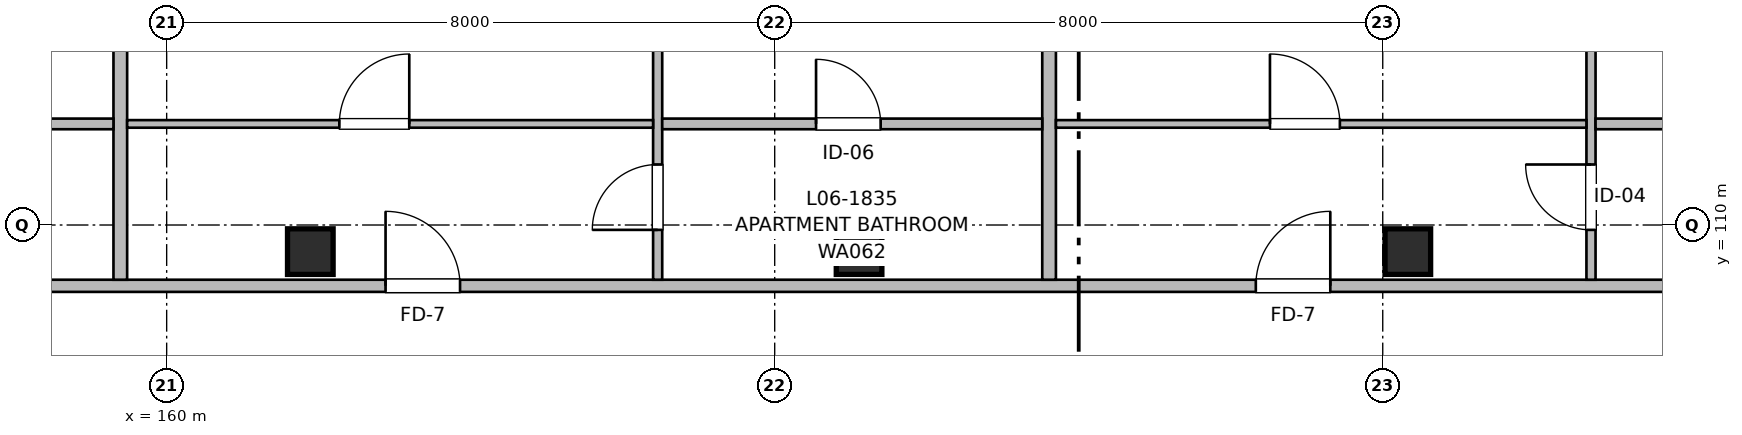
"""IFC4 building model, lengths in metres.
Left out: names, types, materials, properties, quantities, classifications, styles, units other than length and angle.
Written with IfcOpenShell. Run it as: python <this file> out.ifc"""

import sys

from ifc_helpers import new_model, si_unit, direction, frame, frame_2d, origin, origin_2d, place, context, subcontext, project, spatial, rectangle, extrude, element, fill, save


model = new_model("IFC4")
c1 = context("Model", 3, precision=1e-05, world=origin(), true_north=direction((0.0, 1.0)))
c2 = subcontext(c1, "Body", "Model", "MODEL_VIEW")
j1 = project(units=[si_unit("LENGTHUNIT", "METRE"), si_unit("PLANEANGLEUNIT", "RADIAN")], contexts=[c1])
p1 = place(None, origin())
s1 = spatial("IfcSite", under=j1, at=p1, CompositionType="ELEMENT")
p2 = place(p1, origin())
s2 = spatial("IfcBuilding", under=s1, at=p2, CompositionType="ELEMENT")
p3 = place(p2, frame((0.0, 0.0, 20.16)))
s3 = spatial("IfcBuildingStorey", under=s2, at=p3, CompositionType="ELEMENT", Elevation=20.16)
for number, where, z_axis, x_axis in (
    (1, (161.89, 109.65, 0.0), (0.0, 0.0, 1.0), (1.0, 0.0, 0.0)),
    (2, (169.11, 109.65, 0.0), (0.0, 0.0, 1.0), (1.0, 0.0, 0.0)),
    (3, (176.33, 109.65, 0.0), (0.0, 0.0, 1.0), (1.0, 0.0, 0.0)),
):
    element("IfcColumn", number, at=place(p3, frame(where, z_axis=z_axis, x_axis=x_axis)), inside=s3, PredefinedType="COLUMN", context=c2, shape_type="SweptSolid", body=[
        extrude(rectangle(XDim=0.6, YDim=0.6, at=origin_2d()), origin(), (0.0, 0.0, 1.0), 3.2),
    ])
p4 = place(p3, frame((147.16, 109.2, 0.0), z_axis=(0.0, 0.0, 1.0), x_axis=(1.0, 0.0, 0.0)))
e4 = element("IfcWall", 4, at=p4, inside=s3, PredefinedType="PARTITIONING", context=c2, shape_type="SweptSolid", body=[
    extrude(rectangle(XDim=36.68, YDim=0.16, at=frame_2d((18.34, 0.0))), origin(), (0.0, 0.0, 1.0), 2.935),
])
p5 = place(p4, frame((3.03, 0.0, 0.0)))
e5 = element("IfcOpeningElement", 5, at=p5, cuts=e4, PredefinedType="OPENING", context=c2, shape_type="SweptSolid", body=[
    extrude(rectangle(XDim=0.98, YDim=2.15, at=frame_2d((0.49, 1.075))), frame((0.0, 0.09, 0.0), z_axis=(0.0, -1.0, 0.0), x_axis=(1.0, 0.0, 0.0)), (0.0, 0.0, 1.0), 0.18),
])
p6 = place(p4, frame((15.72, 0.0, 0.0)))
e6 = element("IfcOpeningElement", 6, at=p6, cuts=e4, PredefinedType="OPENING", context=c2, shape_type="SweptSolid", body=[
    extrude(rectangle(XDim=0.98, YDim=2.15, at=frame_2d((0.49, 1.075))), frame((0.0, 0.09, 0.0), z_axis=(0.0, -1.0, 0.0), x_axis=(1.0, 0.0, 0.0)), (0.0, 0.0, 1.0), 0.18),
])
p7 = place(p4, frame((27.17, 0.0, 0.0)))
e7 = element("IfcOpeningElement", 7, at=p7, cuts=e4, PredefinedType="OPENING", context=c2, shape_type="SweptSolid", body=[
    extrude(rectangle(XDim=0.98, YDim=2.15, at=frame_2d((0.49, 1.075))), frame((0.0, 0.09, 0.0), z_axis=(0.0, -1.0, 0.0), x_axis=(1.0, 0.0, 0.0)), (0.0, 0.0, 1.0), 0.18),
])
for number, where, z_axis, x_axis in (
    (8, (159.39, 109.28, 0.0), (0.0, 0.0, 1.0), (0.0, 1.0, 0.0)),
    (9, (171.61, 109.28, 0.0), (0.0, 0.0, 1.0), (0.0, 1.0, 0.0)),
):
    element("IfcWall", number, at=place(p3, frame(where, z_axis=z_axis, x_axis=x_axis)), inside=s3, PredefinedType="PARTITIONING", context=c2, shape_type="SweptSolid", body=[
        extrude(rectangle(XDim=6.6, YDim=0.18, at=frame_2d((3.3, 0.0))), origin(), (0.0, 0.0, 1.0), 2.935),
    ])
p8 = place(p3, frame((154.26, 111.33, 0.0), z_axis=(0.0, 0.0, 1.0), x_axis=(1.0, 0.0, 0.0)))
e10 = element("IfcWall", 10, at=p8, inside=s3, PredefinedType="PARTITIONING", context=c2, shape_type="SweptSolid", body=[
    extrude(rectangle(XDim=5.04, YDim=0.14, at=frame_2d((2.52, 0.0))), origin(), (0.0, 0.0, 1.0), 2.935),
])
p9 = place(p8, frame((2.04, 0.0, 0.0)))
e11 = element("IfcOpeningElement", 11, at=p9, cuts=e10, PredefinedType="OPENING", context=c2, shape_type="SweptSolid", body=[
    extrude(rectangle(XDim=0.85, YDim=2.05, at=frame_2d((0.425, 1.025))), frame((0.0, 0.08, 0.0), z_axis=(0.0, -1.0, 0.0), x_axis=(1.0, 0.0, 0.0)), (0.0, 0.0, 1.0), 0.16),
])
p10 = place(p3, frame((166.46, 109.28, 0.0), z_axis=(0.0, 0.0, 1.0), x_axis=(0.0, 1.0, 0.0)))
e12 = element("IfcWall", 12, at=p10, inside=s3, PredefinedType="PARTITIONING", context=c2, shape_type="SweptSolid", body=[
    extrude(rectangle(XDim=6.6, YDim=0.12, at=frame_2d((3.3, 0.0))), origin(), (0.0, 0.0, 1.0), 2.935),
])
p11 = place(p10, frame((0.656, 0.0, 0.0)))
e13 = element("IfcOpeningElement", 13, at=p11, cuts=e12, PredefinedType="OPENING", context=c2, shape_type="SweptSolid", body=[
    extrude(rectangle(XDim=0.86, YDim=2.1, at=frame_2d((0.43, 1.05))), frame((0.0, 0.07, 0.0), z_axis=(0.0, -1.0, 0.0), x_axis=(1.0, 0.0, 0.0)), (0.0, 0.0, 1.0), 0.14),
])
p12 = place(p10, frame((4.097, 0.0, 0.0)))
e14 = element("IfcOpeningElement", 14, at=p12, cuts=e12, PredefinedType="OPENING", context=c2, shape_type="SweptSolid", body=[
    extrude(rectangle(XDim=0.9, YDim=2.1, at=frame_2d((0.45, 1.05))), frame((0.0, 0.07, 0.0), z_axis=(0.0, -1.0, 0.0), x_axis=(1.0, 0.0, 0.0)), (0.0, 0.0, 1.0), 0.14),
])
p13 = place(p3, frame((166.52, 111.33, 0.0), z_axis=(0.0, 0.0, 1.0), x_axis=(1.0, 0.0, 0.0)))
e15 = element("IfcWall", 15, at=p13, inside=s3, PredefinedType="PARTITIONING", context=c2, shape_type="SweptSolid", body=[
    extrude(rectangle(XDim=5.0, YDim=0.14, at=frame_2d((2.5, 0.0))), origin(), (0.0, 0.0, 1.0), 2.935),
])
p14 = place(p13, frame((2.024, 0.0, 0.0)))
e16 = element("IfcOpeningElement", 16, at=p14, cuts=e15, PredefinedType="OPENING", context=c2, shape_type="SweptSolid", body=[
    extrude(rectangle(XDim=0.85, YDim=2.05, at=frame_2d((0.425, 1.025))), frame((0.0, 0.08, 0.0), z_axis=(0.0, -1.0, 0.0), x_axis=(1.0, 0.0, 0.0)), (0.0, 0.0, 1.0), 0.16),
])
p15 = place(p3, frame((159.48, 111.33, 0.0), z_axis=(0.0, 0.0, 1.0), x_axis=(1.0, 0.0, 0.0)))
e17 = element("IfcWall", 17, at=p15, inside=s3, PredefinedType="PARTITIONING", context=c2, shape_type="SweptSolid", body=[
    extrude(rectangle(XDim=6.92, YDim=0.1, at=frame_2d((3.46, 0.0))), origin(), (0.0, 0.0, 1.0), 2.935),
])
p16 = place(p15, frame((2.792, 0.0, 0.0)))
e18 = element("IfcOpeningElement", 18, at=p16, cuts=e17, PredefinedType="OPENING", context=c2, shape_type="SweptSolid", body=[
    extrude(rectangle(XDim=0.92, YDim=2.1, at=frame_2d((0.46, 1.05))), frame((0.0, 0.06, 0.0), z_axis=(0.0, -1.0, 0.0), x_axis=(1.0, 0.0, 0.0)), (0.0, 0.0, 1.0), 0.12),
])
p17 = place(p3, frame((178.74, 109.28, 0.0), z_axis=(0.0, 0.0, 1.0), x_axis=(0.0, 1.0, 0.0)))
e19 = element("IfcWall", 19, at=p17, inside=s3, PredefinedType="PARTITIONING", context=c2, shape_type="SweptSolid", body=[
    extrude(rectangle(XDim=6.6, YDim=0.12, at=frame_2d((3.3, 0.0))), origin(), (0.0, 0.0, 1.0), 2.935),
])
p18 = place(p17, frame((0.656, 0.0, 0.0)))
e20 = element("IfcOpeningElement", 20, at=p18, cuts=e19, PredefinedType="OPENING", context=c2, shape_type="SweptSolid", body=[
    extrude(rectangle(XDim=0.86, YDim=2.1, at=frame_2d((0.43, 1.05))), frame((0.0, 0.07, 0.0), z_axis=(0.0, -1.0, 0.0), x_axis=(1.0, 0.0, 0.0)), (0.0, 0.0, 1.0), 0.14),
])
p19 = place(p17, frame((4.097, 0.0, 0.0)))
e21 = element("IfcOpeningElement", 21, at=p19, cuts=e19, PredefinedType="OPENING", context=c2, shape_type="SweptSolid", body=[
    extrude(rectangle(XDim=0.9, YDim=2.1, at=frame_2d((0.45, 1.05))), frame((0.0, 0.07, 0.0), z_axis=(0.0, -1.0, 0.0), x_axis=(1.0, 0.0, 0.0)), (0.0, 0.0, 1.0), 0.14),
])
p20 = place(p3, frame((178.8, 111.33, 0.0), z_axis=(0.0, 0.0, 1.0), x_axis=(1.0, 0.0, 0.0)))
e22 = element("IfcWall", 22, at=p20, inside=s3, PredefinedType="PARTITIONING", context=c2, shape_type="SweptSolid", body=[
    extrude(rectangle(XDim=5.04, YDim=0.14, at=frame_2d((2.52, 0.0))), origin(), (0.0, 0.0, 1.0), 2.935),
])
p21 = place(p20, frame((2.04, 0.0, 0.0)))
e23 = element("IfcOpeningElement", 23, at=p21, cuts=e22, PredefinedType="OPENING", context=c2, shape_type="SweptSolid", body=[
    extrude(rectangle(XDim=0.85, YDim=2.05, at=frame_2d((0.425, 1.025))), frame((0.0, 0.08, 0.0), z_axis=(0.0, -1.0, 0.0), x_axis=(1.0, 0.0, 0.0)), (0.0, 0.0, 1.0), 0.16),
])
p22 = place(p3, frame((171.7, 111.33, 0.0), z_axis=(0.0, 0.0, 1.0), x_axis=(1.0, 0.0, 0.0)))
e24 = element("IfcWall", 24, at=p22, inside=s3, PredefinedType="PARTITIONING", context=c2, shape_type="SweptSolid", body=[
    extrude(rectangle(XDim=6.98, YDim=0.1, at=frame_2d((3.49, 0.0))), origin(), (0.0, 0.0, 1.0), 2.935),
])
p23 = place(p22, frame((2.816, 0.0, 0.0)))
e25 = element("IfcOpeningElement", 25, at=p23, cuts=e24, PredefinedType="OPENING", context=c2, shape_type="SweptSolid", body=[
    extrude(rectangle(XDim=0.92, YDim=2.1, at=frame_2d((0.46, 1.05))), frame((0.0, 0.06, 0.0), z_axis=(0.0, -1.0, 0.0), x_axis=(1.0, 0.0, 0.0)), (0.0, 0.0, 1.0), 0.12),
])
p24 = place(p6, origin())
e26 = element("IfcDoor", 26, at=p24, inside=s3, OperationType="SINGLE_SWING_LEFT", PredefinedType="DOOR", context=c2, shape_type="SweptSolid", body=[
    extrude(rectangle(XDim=0.98, YDim=2.15, at=frame_2d((0.49, 1.075))), frame((0.0, 0.025, 0.0), z_axis=(0.0, -1.0, 0.0), x_axis=(1.0, 0.0, 0.0)), (0.0, 0.0, 1.0), 0.05),
])
fill(e6, e26)
p25 = place(p16, origin())
e27 = element("IfcDoor", 27, at=p25, inside=s3, OperationType="SINGLE_SWING_RIGHT", PredefinedType="DOOR", context=c2, shape_type="SweptSolid", body=[
    extrude(rectangle(XDim=0.92, YDim=2.1, at=frame_2d((0.46, 1.05))), frame((0.0, 0.025, 0.0), z_axis=(0.0, -1.0, 0.0), x_axis=(1.0, 0.0, 0.0)), (0.0, 0.0, 1.0), 0.05),
])
fill(e18, e27)
p26 = place(p11, origin())
e28 = element("IfcDoor", 28, at=p26, inside=s3, OperationType="SINGLE_SWING_LEFT", PredefinedType="DOOR", context=c2, shape_type="SweptSolid", body=[
    extrude(rectangle(XDim=0.86, YDim=2.1, at=frame_2d((0.43, 1.05))), frame((0.0, 0.025, 0.0), z_axis=(0.0, -1.0, 0.0), x_axis=(1.0, 0.0, 0.0)), (0.0, 0.0, 1.0), 0.05),
])
fill(e13, e28)
p27 = place(p14, origin())
e29 = element("IfcDoor", 29, at=p27, inside=s3, OperationType="SINGLE_SWING_LEFT", PredefinedType="DOOR", context=c2, shape_type="SweptSolid", body=[
    extrude(rectangle(XDim=0.85, YDim=2.05, at=frame_2d((0.425, 1.025))), frame((0.0, 0.025, 0.0), z_axis=(0.0, -1.0, 0.0), x_axis=(1.0, 0.0, 0.0)), (0.0, 0.0, 1.0), 0.05),
])
fill(e16, e29)
p28 = place(p7, origin())
e30 = element("IfcDoor", 30, at=p28, inside=s3, OperationType="SINGLE_SWING_RIGHT", PredefinedType="DOOR", context=c2, shape_type="SweptSolid", body=[
    extrude(rectangle(XDim=0.98, YDim=2.15, at=frame_2d((0.49, 1.075))), frame((0.0, 0.025, 0.0), z_axis=(0.0, -1.0, 0.0), x_axis=(1.0, 0.0, 0.0)), (0.0, 0.0, 1.0), 0.05),
])
fill(e7, e30)
p29 = place(p23, origin())
e31 = element("IfcDoor", 31, at=p29, inside=s3, OperationType="SINGLE_SWING_LEFT", PredefinedType="DOOR", context=c2, shape_type="SweptSolid", body=[
    extrude(rectangle(XDim=0.92, YDim=2.1, at=frame_2d((0.46, 1.05))), frame((0.0, 0.025, 0.0), z_axis=(0.0, -1.0, 0.0), x_axis=(1.0, 0.0, 0.0)), (0.0, 0.0, 1.0), 0.05),
])
fill(e25, e31)
p30 = place(p18, origin())
e32 = element("IfcDoor", 32, at=p30, inside=s3, OperationType="SINGLE_SWING_RIGHT", PredefinedType="DOOR", context=c2, shape_type="SweptSolid", body=[
    extrude(rectangle(XDim=0.86, YDim=2.1, at=frame_2d((0.43, 1.05))), frame((0.0, 0.025, 0.0), z_axis=(0.0, -1.0, 0.0), x_axis=(1.0, 0.0, 0.0)), (0.0, 0.0, 1.0), 0.05),
])
fill(e20, e32)
save(model, sys.argv[1])
